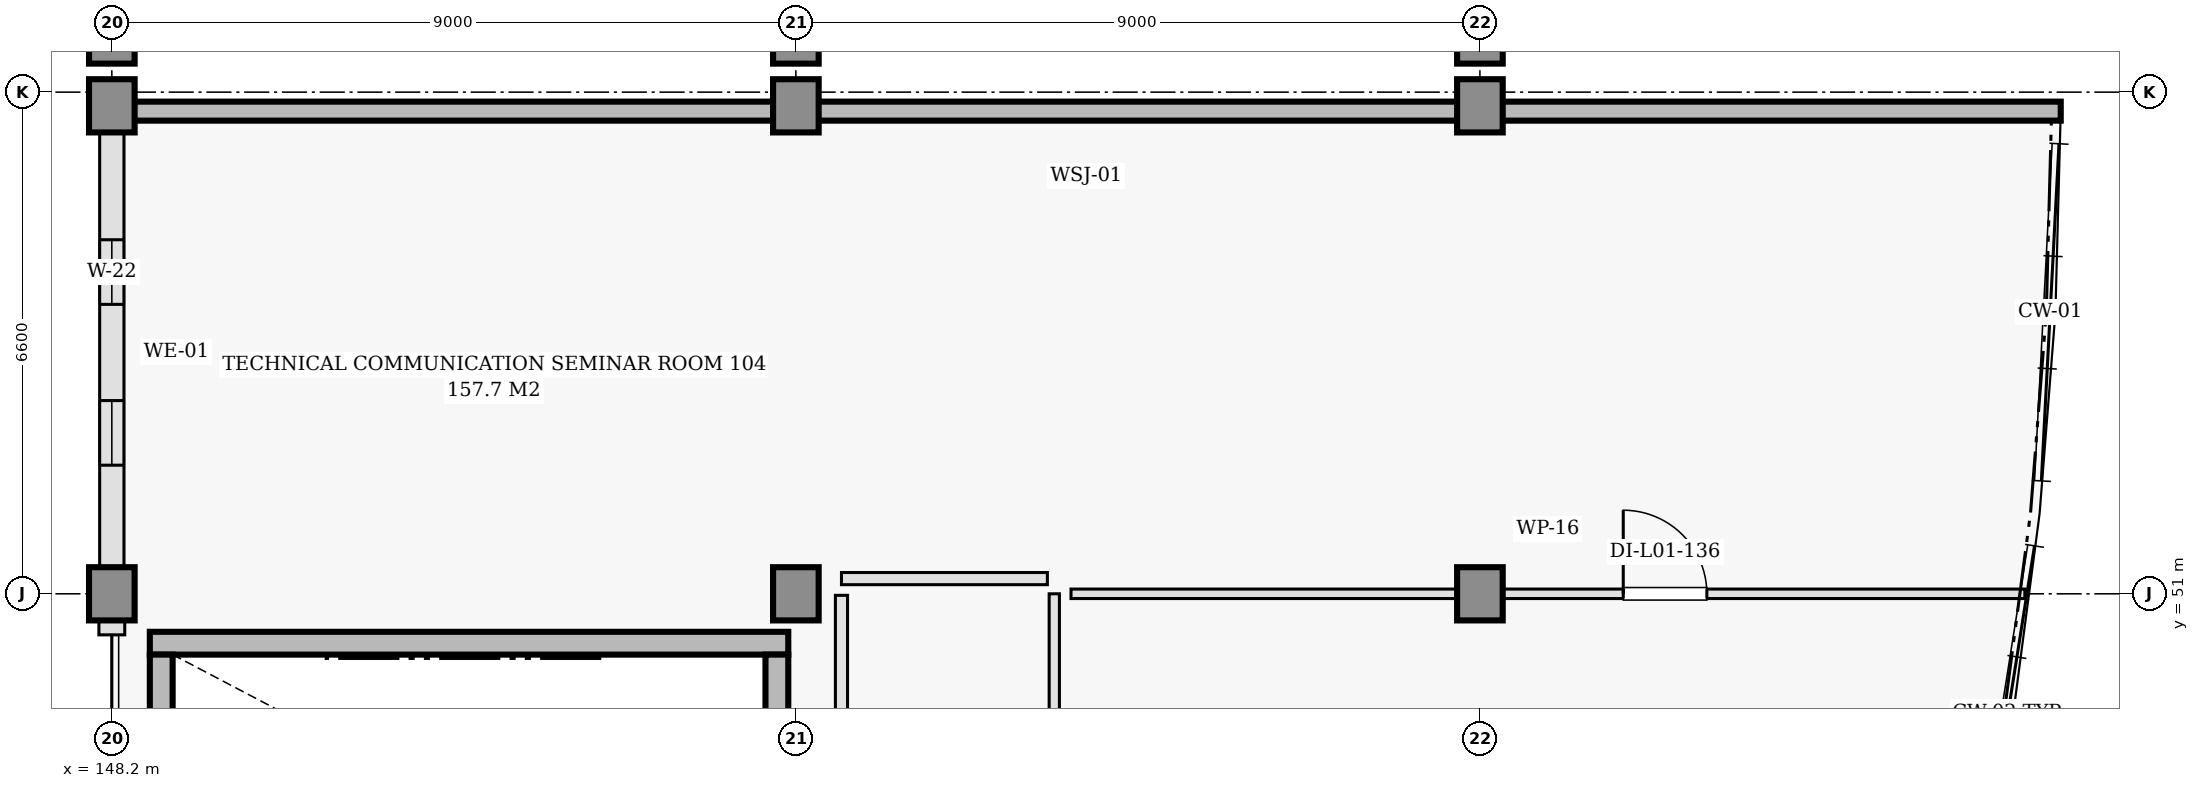
"""IFC4 building model, lengths in metres.
Left out: names, types, materials, properties, quantities, classifications, styles, units other than length and angle.
Written with IfcOpenShell. Run it as: python <this file> out.ifc"""

import sys

from ifc_helpers import new_model, si_unit, direction, frame, frame_2d, origin, origin_2d, place, context, subcontext, project, spatial, rectangle, i_section, extrude, element, fill, save


model = new_model("IFC4")
c1 = context("Model", 3, precision=1e-05, world=origin(), true_north=direction((0.0, 1.0)))
c2 = subcontext(c1, "Body", "Model", "MODEL_VIEW")
j1 = project(units=[si_unit("LENGTHUNIT", "METRE"), si_unit("PLANEANGLEUNIT", "RADIAN")], contexts=[c1])
p1 = place(None, origin())
s1 = spatial("IfcSite", under=j1, at=p1, CompositionType="ELEMENT")
p2 = place(p1, origin())
s2 = spatial("IfcBuilding", under=s1, at=p2, CompositionType="ELEMENT")
p3 = place(p2, frame((0.0, 0.0, 4.8)))
s3 = spatial("IfcBuildingStorey", under=s2, at=p3, CompositionType="ELEMENT", Elevation=4.8)
for number, where, z_axis, x_axis in (
    (1, (148.2, 51.0, 0.0), (0.0, 0.0, 1.0), (1.0, 0.0, 0.0)),
    (2, (148.2, 57.42, 0.0), (0.0, 0.0, 1.0), (1.0, 0.0, 0.0)),
    (3, (157.2, 51.0, 0.0), (0.0, 0.0, 1.0), (1.0, 0.0, 0.0)),
    (4, (157.2, 57.42, 0.0), (0.0, 0.0, 1.0), (1.0, 0.0, 0.0)),
    (5, (166.2, 51.0, 0.0), (0.0, 0.0, 1.0), (1.0, 0.0, 0.0)),
    (6, (166.2, 57.42, 0.0), (0.0, 0.0, 1.0), (1.0, 0.0, 0.0)),
):
    element("IfcColumn", number, at=place(p3, frame(where, z_axis=z_axis, x_axis=x_axis)), inside=s3, PredefinedType="COLUMN", context=c2, shape_type="SweptSolid", body=[
        extrude(rectangle(XDim=0.7, YDim=0.7, at=origin_2d()), origin(), (0.0, 0.0, 1.0), 4.8),
    ])
for number, where, z_axis, x_axis in (
    (7, (148.2, 58.2, 0.0), (0.0, 0.0, 1.0), (1.0, 0.0, 0.0)),
    (8, (157.2, 58.2, 0.0), (0.0, 0.0, 1.0), (1.0, 0.0, 0.0)),
    (9, (166.2, 58.2, 0.0), (0.0, 0.0, 1.0), (1.0, 0.0, 0.0)),
):
    element("IfcColumn", number, at=place(p3, frame(where, z_axis=z_axis, x_axis=x_axis)), inside=s3, PredefinedType="COLUMN", context=c2, shape_type="SweptSolid", body=[
        extrude(i_section(OverallWidth=0.3, OverallDepth=0.45, WebThickness=0.014, FlangeThickness=0.026, FilletRadius=0.027, at=origin_2d()), origin(), (0.0, 0.0, 1.0), 4.8),
    ])
p4 = place(p3, frame((173.842, 57.35, 0.0), z_axis=(0.0, 0.0, 1.0), x_axis=(-1.0, 0.0, 0.0)))
e10 = element("IfcWall", 10, at=p4, inside=s3, PredefinedType="SHEAR", context=c2, shape_type="SweptSolid", body=[
    extrude(rectangle(XDim=25.642, YDim=0.25, at=frame_2d((12.821, 0.0))), origin(), (0.0, 0.0, 1.0), 4.48),
])
p5 = place(p3, frame((148.2, 57.35, 0.0), z_axis=(0.0, 0.0, 1.0), x_axis=(0.0, -1.0, 0.0)))
e11 = element("IfcWall", 11, at=p5, inside=s3, PredefinedType="SOLIDWALL", context=c2, shape_type="SweptSolid", body=[
    extrude(rectangle(XDim=6.35, YDim=0.32, at=frame_2d((3.175, 0.0))), origin(), (0.0, 0.0, 1.0), 3.665),
])
p6 = place(p5, frame((1.692, 0.0, 0.9)))
e12 = element("IfcOpeningElement", 12, at=p6, cuts=e11, PredefinedType="OPENING", context=c2, shape_type="SweptSolid", body=[
    extrude(rectangle(XDim=0.85, YDim=1.3, at=frame_2d((0.425, 0.65))), frame((0.0, 0.17, 0.0), z_axis=(0.0, -1.0, 0.0), x_axis=(1.0, 0.0, 0.0)), (0.0, 0.0, 1.0), 0.34),
])
p7 = place(p5, frame((3.808, 0.0, 0.9)))
e13 = element("IfcOpeningElement", 13, at=p7, cuts=e11, PredefinedType="OPENING", context=c2, shape_type="SweptSolid", body=[
    extrude(rectangle(XDim=0.85, YDim=1.3, at=frame_2d((0.425, 0.65))), frame((0.0, 0.17, 0.0), z_axis=(0.0, -1.0, 0.0), x_axis=(1.0, 0.0, 0.0)), (0.0, 0.0, 1.0), 0.34),
])
p8 = place(p3, frame((148.2, 51.0, 0.0), z_axis=(0.0, 0.0, 1.0), x_axis=(0.0, -1.0, 0.0)))
e14 = element("IfcWall", 14, at=p8, inside=s3, PredefinedType="SOLIDWALL", context=c2, shape_type="SweptSolid", body=[
    extrude(rectangle(XDim=0.54, YDim=0.34, at=frame_2d((0.27, 0.0))), origin(), (0.0, 0.0, 1.0), 3.665),
])
p9 = place(p3, frame((148.7, 50.35, 0.0), z_axis=(0.0, 0.0, 1.0), x_axis=(1.0, 0.0, 0.0)))
e15 = element("IfcWall", 15, at=p9, inside=s3, PredefinedType="SHEAR", context=c2, shape_type="SweptSolid", body=[
    extrude(rectangle(XDim=8.4, YDim=0.3, at=frame_2d((4.2, 0.0))), origin(), (0.0, 0.0, 1.0), 4.48),
])
for number, where, z_axis, x_axis in (
    (16, (148.85, 46.1, 0.0), (0.0, 0.0, 1.0), (0.0, 1.0, 0.0)),
    (17, (156.95, 46.1, 0.0), (0.0, 0.0, 1.0), (0.0, 1.0, 0.0)),
):
    element("IfcWall", number, at=place(p3, frame(where, z_axis=z_axis, x_axis=x_axis)), inside=s3, PredefinedType="SHEAR", context=c2, shape_type="SweptSolid", body=[
        extrude(rectangle(XDim=4.1, YDim=0.3, at=frame_2d((2.05, 0.0))), origin(), (0.0, 0.0, 1.0), 4.48),
    ])
p10 = place(p3, frame((160.6, 43.22, 0.0), z_axis=(0.0, 0.0, 1.0), x_axis=(0.0, 1.0, 0.0)))
e18 = element("IfcWall", 18, at=p10, inside=s3, PredefinedType="PARTITIONING", context=c2, shape_type="SweptSolid", body=[
    extrude(rectangle(XDim=7.78, YDim=0.135, at=frame_2d((3.89, 0.0))), origin(), (0.0, 0.0, 1.0), 2.965),
])
p11 = place(p3, frame((160.82, 51.0, 0.0), z_axis=(0.0, 0.0, 1.0), x_axis=(1.0, 0.0, 0.0)))
e19 = element("IfcWall", 19, at=p11, inside=s3, PredefinedType="PARTITIONING", context=c2, shape_type="SweptSolid", body=[
    extrude(rectangle(XDim=12.55, YDim=0.125, at=frame_2d((6.275, 0.0))), origin(), (0.0, 0.0, 1.0), 2.965),
])
p12 = place(p11, frame((7.266, 0.0, 0.0)))
e20 = element("IfcOpeningElement", 20, at=p12, cuts=e19, PredefinedType="OPENING", context=c2, shape_type="SweptSolid", body=[
    extrude(rectangle(XDim=1.1, YDim=2.15, at=frame_2d((0.55, 1.075))), frame((0.0, 0.073, 0.0), z_axis=(0.0, -1.0, 0.0), x_axis=(1.0, 0.0, 0.0)), (0.0, 0.0, 1.0), 0.145),
])
p13 = place(p3, frame((157.8, 51.2, 0.0), z_axis=(0.0, 0.0, 1.0), x_axis=(1.0, 0.0, 0.0)))
e21 = element("IfcWall", 21, at=p13, inside=s3, PredefinedType="PARTITIONING", context=c2, shape_type="SweptSolid", body=[
    extrude(rectangle(XDim=2.709, YDim=0.16, at=frame_2d((1.354, 0.0))), origin(), (0.0, 0.0, 1.0), 2.965),
])
p14 = place(p3, frame((157.8, 43.22, 0.0), z_axis=(0.0, 0.0, 1.0), x_axis=(0.0, 1.0, 0.0)))
e22 = element("IfcWall", 22, at=p14, inside=s3, PredefinedType="PARTITIONING", context=c2, shape_type="SweptSolid", body=[
    extrude(rectangle(XDim=7.76, YDim=0.16, at=frame_2d((3.88, 0.0))), origin(), (0.0, 0.0, 1.0), 2.965),
])
p15 = place(p6, origin())
e23 = element("IfcWindow", 23, at=p15, inside=s3, PartitioningType="DOUBLE_PANEL_VERTICAL", PredefinedType="WINDOW", context=c2, shape_type="SweptSolid", body=[
    extrude(rectangle(XDim=0.85, YDim=1.3, at=frame_2d((0.425, 0.65))), frame((0.0, 0.03, 0.0), z_axis=(0.0, -1.0, 0.0), x_axis=(1.0, 0.0, 0.0)), (0.0, 0.0, 1.0), 0.06),
])
fill(e12, e23)
p16 = place(p7, origin())
e24 = element("IfcWindow", 24, at=p16, inside=s3, PartitioningType="DOUBLE_PANEL_VERTICAL", PredefinedType="WINDOW", context=c2, shape_type="SweptSolid", body=[
    extrude(rectangle(XDim=0.85, YDim=1.3, at=frame_2d((0.425, 0.65))), frame((0.0, 0.03, 0.0), z_axis=(0.0, -1.0, 0.0), x_axis=(1.0, 0.0, 0.0)), (0.0, 0.0, 1.0), 0.06),
])
fill(e13, e24)
p17 = place(p12, origin())
e25 = element("IfcDoor", 25, at=p17, inside=s3, OperationType="SINGLE_SWING_LEFT", PredefinedType="DOOR", context=c2, shape_type="SweptSolid", body=[
    extrude(rectangle(XDim=1.1, YDim=2.15, at=frame_2d((0.55, 1.075))), frame((0.0, 0.025, 0.0), z_axis=(0.0, -1.0, 0.0), x_axis=(1.0, 0.0, 0.0)), (0.0, 0.0, 1.0), 0.05),
])
fill(e20, e25)
save(model, sys.argv[1])
